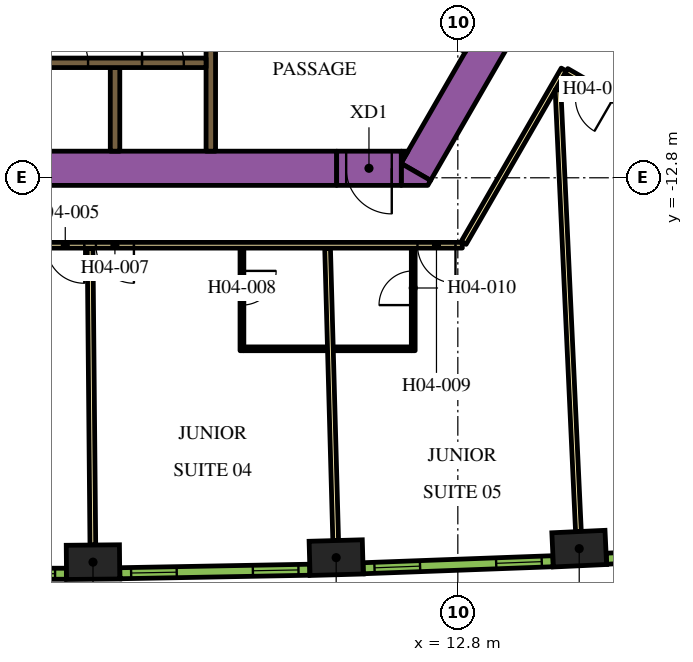
"""IFC4 building model, lengths in metres.
Left out: names, types, materials, properties, quantities, classifications, styles, units other than length and angle.
Written with IfcOpenShell. Run it as: python <this file> out.ifc"""

import sys

from ifc_helpers import new_model, si_unit, direction, frame, frame_2d, origin, origin_2d, place, context, subcontext, project, spatial, polyline, rectangle, outline, extrude, element, fill, save


model = new_model("IFC4")
c1 = context("Model", 3, precision=1e-05, world=origin(), true_north=direction((0.0, 1.0)))
c2 = subcontext(c1, "Body", "Model", "MODEL_VIEW")
j1 = project(units=[si_unit("LENGTHUNIT", "METRE"), si_unit("PLANEANGLEUNIT", "RADIAN")], contexts=[c1])
p1 = place(None, origin())
s1 = spatial("IfcSite", under=j1, at=p1, CompositionType="ELEMENT")
p2 = place(p1, origin())
s2 = spatial("IfcBuilding", under=s1, at=p2, CompositionType="ELEMENT")
p3 = place(p2, frame((0.0, 0.0, 70.5)))
s3 = spatial("IfcBuildingStorey", under=s2, at=p3, CompositionType="ELEMENT", Elevation=70.5)
for number, where, z_axis, x_axis in (
    (1, (3.2, -22.913, 0.0), (0.0, 0.0, 1.0), (1.0, 0.009, 0.0)),
    (2, (9.599, -22.795, 0.0), (0.0, 0.0, 1.0), (1.0, 0.028, 0.0)),
    (3, (15.994, -22.558, 0.0), (0.0, 0.0, 1.0), (0.999, 0.046, 0.0)),
):
    element("IfcColumn", number, at=place(p3, frame(where, z_axis=z_axis, x_axis=x_axis)), inside=s3, PredefinedType="COLUMN", context=c2, shape_type="SweptSolid", body=[
        extrude(rectangle(XDim=1.4, YDim=0.9, at=origin_2d()), origin(), (0.0, 0.0, 1.0), 3.9),
    ])
p4 = place(p3, frame((11.695, -12.644, 0.0), z_axis=(0.0, 0.0, 1.0), x_axis=(0.500010229568, 0.86601949766, 0.0)))
e4 = element("IfcWall", 4, at=p4, inside=s3, PredefinedType="SOLIDWALL", context=c2, shape_type="SweptSolid", body=[
    extrude(rectangle(XDim=9.326, YDim=0.9, at=frame_2d((4.663, 0.0))), origin(), (0.0, 0.0, 1.0), 3.9),
])
p5 = place(p3, origin())
e5 = element("IfcWall", 5, at=p5, inside=s3, PredefinedType="SOLIDWALL", context=c2, shape_type="SweptSolid", body=[
    extrude(outline(polyline([(12.009, -13.0), (11.312, -13.0), (11.312, -12.425), (12.083, -12.871), (12.009, -13.0)])), origin(), (0.0, 0.0, 1.0), 3.9),
])
e6 = element("IfcWall", 6, at=p5, inside=s3, PredefinedType="SOLIDWALL", context=c2, shape_type="SweptSolid", body=[
    extrude(outline(polyline([(11.489, -12.1), (11.312, -12.407), (11.312, -12.1), (11.489, -12.1)])), origin(), (0.0, 0.0, 1.0), 3.9),
])
p6 = place(p3, frame((-12.019, -12.55, 0.0), z_axis=(0.0, 0.0, 1.0), x_axis=(1.0, 0.0, 0.0)))
e7 = element("IfcWall", 7, at=p6, inside=s3, PredefinedType="SOLIDWALL", context=c2, shape_type="SweptSolid", body=[
    extrude(rectangle(XDim=21.63, YDim=0.9, at=frame_2d((10.815, 0.0))), origin(), (0.0, 0.0, 1.0), 3.9),
])
p7 = place(p3, frame((6.3, -12.1, 0.0), z_axis=(0.0, 0.0, 1.0), x_axis=(0.0, 1.0, 0.0)))
e8 = element("IfcWall", 8, at=p7, inside=s3, PredefinedType="SOLIDWALL", context=c2, shape_type="SweptSolid", body=[
    extrude(rectangle(XDim=3.428, YDim=0.25, at=frame_2d((1.714, 0.0))), origin(), (0.0, 0.0, 1.0), 3.9),
])
p8 = place(p3, frame((3.78, -12.1, 0.0), z_axis=(0.0, 0.0, 1.0), x_axis=(0.0, 1.0, 0.0)))
e9 = element("IfcWall", 9, at=p8, inside=s3, PredefinedType="SOLIDWALL", context=c2, shape_type="SweptSolid", body=[
    extrude(rectangle(XDim=2.2, YDim=0.25, at=frame_2d((1.1, 0.0))), origin(), (0.0, 0.0, 1.0), 3.9),
])
p9 = place(p3, frame((-6.175, -9.775, 0.0), z_axis=(0.0, 0.0, 1.0), x_axis=(1.0, 0.0, 0.0)))
e10 = element("IfcWall", 10, at=p9, inside=s3, PredefinedType="SOLIDWALL", context=c2, shape_type="SweptSolid", body=[
    extrude(rectangle(XDim=12.35, YDim=0.25, at=frame_2d((6.175, 0.0))), origin(), (0.0, 0.0, 1.0), 3.9),
])
p10 = place(p9, frame((0.585, 0.0, 0.0)))
e11 = element("IfcOpeningElement", 11, at=p10, cuts=e10, PredefinedType="OPENING", context=c2, shape_type="SweptSolid", body=[
    extrude(rectangle(XDim=1.1, YDim=2.1, at=frame_2d((0.55, 1.05))), frame((0.0, 0.135, 0.0), z_axis=(0.0, -1.0, 0.0), x_axis=(1.0, 0.0, 0.0)), (0.0, 0.0, 1.0), 0.27),
])
p11 = place(p9, frame((3.105, 0.0, 0.0)))
e12 = element("IfcOpeningElement", 12, at=p11, cuts=e10, PredefinedType="OPENING", context=c2, shape_type="SweptSolid", body=[
    extrude(rectangle(XDim=1.1, YDim=2.1, at=frame_2d((0.55, 1.05))), frame((0.0, 0.135, 0.0), z_axis=(0.0, -1.0, 0.0), x_axis=(1.0, 0.0, 0.0)), (0.0, 0.0, 1.0), 0.27),
])
p12 = place(p9, frame((5.625, 0.0, 0.0)))
e13 = element("IfcOpeningElement", 13, at=p12, cuts=e10, PredefinedType="OPENING", context=c2, shape_type="SweptSolid", body=[
    extrude(rectangle(XDim=1.1, YDim=2.1, at=frame_2d((0.55, 1.05))), frame((0.0, 0.135, 0.0), z_axis=(0.0, -1.0, 0.0), x_axis=(1.0, 0.0, 0.0)), (0.0, 0.0, 1.0), 0.27),
])
p13 = place(p9, frame((8.145, 0.0, 0.0)))
e14 = element("IfcOpeningElement", 14, at=p13, cuts=e10, PredefinedType="OPENING", context=c2, shape_type="SweptSolid", body=[
    extrude(rectangle(XDim=1.1, YDim=2.1, at=frame_2d((0.55, 1.05))), frame((0.0, 0.135, 0.0), z_axis=(0.0, -1.0, 0.0), x_axis=(1.0, 0.0, 0.0)), (0.0, 0.0, 1.0), 0.27),
])
p14 = place(p9, frame((10.665, 0.0, 0.0)))
e15 = element("IfcOpeningElement", 15, at=p14, cuts=e10, PredefinedType="OPENING", context=c2, shape_type="SweptSolid", body=[
    extrude(rectangle(XDim=1.1, YDim=2.1, at=frame_2d((0.55, 1.05))), frame((0.0, 0.135, 0.0), z_axis=(0.0, -1.0, 0.0), x_axis=(1.0, 0.0, 0.0)), (0.0, 0.0, 1.0), 0.27),
])
p15 = place(p3, frame((11.312, -12.55, 0.0), z_axis=(0.0, 0.0, 1.0), x_axis=(-1.0, 0.0, 0.0)))
e16 = element("IfcWall", 16, at=p15, inside=s3, PredefinedType="SOLIDWALL", context=c2, shape_type="SweptSolid", body=[
    extrude(rectangle(XDim=1.7, YDim=0.9, at=frame_2d((0.85, 0.0))), origin(), (0.0, 0.0, 1.0), 3.9),
])
p16 = place(p15, frame((0.25, 0.0, 0.0)))
e17 = element("IfcOpeningElement", 17, at=p16, cuts=e16, PredefinedType="OPENING", context=c2, shape_type="SweptSolid", body=[
    extrude(rectangle(XDim=1.2, YDim=2.1, at=frame_2d((0.6, 1.05))), frame((0.0, 0.46, 0.0), z_axis=(0.0, -1.0, 0.0), x_axis=(1.0, 0.0, 0.0)), (0.0, 0.0, 1.0), 0.92),
])
p17 = place(p3, frame((16.412, -8.523, 0.0), z_axis=(0.0, 0.0, 1.0), x_axis=(0.866022197818, -0.500005552856, 0.0)))
e18 = element("IfcWall", 18, at=p17, inside=s3, PredefinedType="PARTITIONING", context=c2, shape_type="SweptSolid", body=[
    extrude(rectangle(XDim=16.224, YDim=0.15, at=frame_2d((8.112, 0.0))), origin(), (0.0, 0.0, 1.0), 2.75),
])
p18 = place(p17, frame((4.223, 0.0, 0.0)))
e19 = element("IfcOpeningElement", 19, at=p18, cuts=e18, PredefinedType="OPENING", context=c2, shape_type="SweptSolid", body=[
    extrude(rectangle(XDim=1.0, YDim=2.1, at=frame_2d((0.5, 1.05))), frame((0.0, 0.085, 0.0), z_axis=(0.0, -1.0, 0.0), x_axis=(1.0, 0.0, 0.0)), (0.0, 0.0, 1.0), 0.17),
])
p19 = place(p3, frame((12.918, -14.575, 0.0), z_axis=(0.0, 0.0, 1.0), x_axis=(-1.0, 0.0, 0.0)))
e20 = element("IfcWall", 20, at=p19, inside=s3, PredefinedType="PARTITIONING", context=c2, shape_type="SweptSolid", body=[
    extrude(rectangle(XDim=25.766, YDim=0.15, at=frame_2d((12.883, 0.0))), origin(), (0.0, 0.0, 1.0), 2.75),
])
p20 = place(p19, frame((24.586, 0.0, 0.0)))
e21 = element("IfcOpeningElement", 21, at=p20, cuts=e20, PredefinedType="OPENING", context=c2, shape_type="SweptSolid", body=[
    extrude(rectangle(XDim=1.0, YDim=2.1, at=frame_2d((0.5, 1.05))), frame((0.0, 0.085, 0.0), z_axis=(0.0, -1.0, 0.0), x_axis=(1.0, 0.0, 0.0)), (0.0, 0.0, 1.0), 0.17),
])
p21 = place(p19, frame((9.948, 0.0, 0.0)))
e22 = element("IfcOpeningElement", 22, at=p21, cuts=e20, PredefinedType="OPENING", context=c2, shape_type="SweptSolid", body=[
    extrude(rectangle(XDim=1.0, YDim=2.1, at=frame_2d((0.5, 1.05))), frame((0.0, 0.085, 0.0), z_axis=(0.0, -1.0, 0.0), x_axis=(1.0, 0.0, 0.0)), (0.0, 0.0, 1.0), 0.17),
])
p22 = place(p19, frame((8.642, 0.0, 0.0)))
e23 = element("IfcOpeningElement", 23, at=p22, cuts=e20, PredefinedType="OPENING", context=c2, shape_type="SweptSolid", body=[
    extrude(rectangle(XDim=1.0, YDim=2.1, at=frame_2d((0.5, 1.05))), frame((0.0, 0.085, 0.0), z_axis=(0.0, -1.0, 0.0), x_axis=(1.0, 0.0, 0.0)), (0.0, 0.0, 1.0), 0.17),
])
p23 = place(p19, frame((0.18, 0.0, 0.0)))
e24 = element("IfcOpeningElement", 24, at=p23, cuts=e20, PredefinedType="OPENING", context=c2, shape_type="SweptSolid", body=[
    extrude(rectangle(XDim=1.0, YDim=2.1, at=frame_2d((0.5, 1.05))), frame((0.0, 0.085, 0.0), z_axis=(0.0, -1.0, 0.0), x_axis=(1.0, 0.0, 0.0)), (0.0, 0.0, 1.0), 0.17),
])
p24 = place(p3, frame((15.587, -9.952, 0.0), z_axis=(0.0, 0.0, 1.0), x_axis=(-0.500016618951, -0.866015808616, 0.0)))
e25 = element("IfcWall", 25, at=p24, inside=s3, PredefinedType="PARTITIONING", context=c2, shape_type="SweptSolid", body=[
    extrude(rectangle(XDim=5.268, YDim=0.15, at=frame_2d((2.634, 0.0))), origin(), (0.0, 0.0, 1.0), 2.75),
])
p25 = place(p3, frame((29.638, -18.064, 0.0), z_axis=(0.0, 0.0, 1.0), x_axis=(-0.866026175601, 0.499998663172, 0.0)))
e26 = element("IfcWall", 26, at=p25, inside=s3, PredefinedType="PARTITIONING", context=c2, shape_type="SweptSolid", body=[
    extrude(rectangle(XDim=16.144, YDim=0.15, at=frame_2d((8.072, 0.0))), origin(), (0.0, 0.0, 1.0), 2.75),
])
p26 = place(p25, frame((14.714, 0.0, 0.0)))
e27 = element("IfcOpeningElement", 27, at=p26, cuts=e26, PredefinedType="OPENING", context=c2, shape_type="SweptSolid", body=[
    extrude(rectangle(XDim=1.0, YDim=2.1, at=frame_2d((0.5, 1.05))), frame((0.0, 0.085, 0.0), z_axis=(0.0, -1.0, 0.0), x_axis=(1.0, 0.0, 0.0)), (0.0, 0.0, 1.0), 0.17),
])
p27 = place(p25, frame((7.275, 0.0, 0.0)))
e28 = element("IfcOpeningElement", 28, at=p27, cuts=e26, PredefinedType="OPENING", context=c2, shape_type="SweptSolid", body=[
    extrude(rectangle(XDim=1.0, YDim=2.1, at=frame_2d((0.5, 1.05))), frame((0.0, 0.085, 0.0), z_axis=(0.0, -1.0, 0.0), x_axis=(1.0, 0.0, 0.0)), (0.0, 0.0, 1.0), 0.17),
])
p28 = place(p3, frame((3.196, -22.463, 0.0), z_axis=(0.0, 0.0, 1.0), x_axis=(-0.00926060032, 0.999957119721, 0.0)))
e29 = element("IfcWall", 29, at=p28, inside=s3, PredefinedType="PARTITIONING", context=c2, shape_type="SweptSolid", body=[
    extrude(rectangle(XDim=7.803, YDim=0.15, at=frame_2d((3.902, 0.0))), origin(), (0.0, 0.0, 1.0), 2.75),
])
p29 = place(p3, frame((9.586, -22.345, 0.0), z_axis=(0.0, 0.0, 1.0), x_axis=(-0.027722115646, 0.999615668297, 0.0)))
e30 = element("IfcWall", 30, at=p29, inside=s3, PredefinedType="PARTITIONING", context=c2, shape_type="SweptSolid", body=[
    extrude(rectangle(XDim=7.688, YDim=0.15, at=frame_2d((3.844, 0.0))), origin(), (0.0, 0.0, 1.0), 2.75),
])
p30 = place(p3, frame((15.973, -22.109, 0.0), z_axis=(0.0, 0.0, 1.0), x_axis=(-0.046191717129, 0.998932592955, 0.0)))
e31 = element("IfcWall", 31, at=p30, inside=s3, PredefinedType="PARTITIONING", context=c2, shape_type="SweptSolid", body=[
    extrude(rectangle(XDim=11.638, YDim=0.15, at=frame_2d((5.819, 0.0))), origin(), (0.0, 0.0, 1.0), 2.75),
])
p31 = place(p3, frame((7.119, -14.65, 0.0), z_axis=(0.0, 0.0, 1.0), x_axis=(0.0, -1.0, 0.0)))
e32 = element("IfcWall", 32, at=p31, inside=s3, PredefinedType="PARTITIONING", context=c2, shape_type="SweptSolid", body=[
    extrude(rectangle(XDim=2.7, YDim=0.1, at=frame_2d((1.35, 0.0))), origin(), (0.0, 0.0, 1.0), 2.75),
])
p32 = place(p31, frame((0.6, 0.0, 0.0)))
e33 = element("IfcOpeningElement", 33, at=p32, cuts=e32, PredefinedType="OPENING", context=c2, shape_type="SweptSolid", body=[
    extrude(rectangle(XDim=0.9, YDim=2.1, at=frame_2d((0.45, 1.05))), frame((0.0, 0.06, 0.0), z_axis=(0.0, -1.0, 0.0), x_axis=(1.0, 0.0, 0.0)), (0.0, 0.0, 1.0), 0.12),
])
p33 = place(p3, frame((7.169, -17.3, 0.0), z_axis=(0.0, 0.0, 1.0), x_axis=(1.0, 0.0, 0.0)))
e34 = element("IfcWall", 34, at=p33, inside=s3, PredefinedType="PARTITIONING", context=c2, shape_type="SweptSolid", body=[
    extrude(rectangle(XDim=2.2, YDim=0.1, at=frame_2d((1.1, 0.0))), origin(), (0.0, 0.0, 1.0), 2.75),
])
p34 = place(p3, frame((11.627, -17.35, 0.0), z_axis=(0.0, 0.0, 1.0), x_axis=(0.0, 1.0, 0.0)))
e35 = element("IfcWall", 35, at=p34, inside=s3, PredefinedType="PARTITIONING", context=c2, shape_type="SweptSolid", body=[
    extrude(rectangle(XDim=2.7, YDim=0.1, at=frame_2d((1.35, 0.0))), origin(), (0.0, 0.0, 1.0), 2.75),
])
p35 = place(p34, frame((1.2, 0.0, 0.0)))
e36 = element("IfcOpeningElement", 36, at=p35, cuts=e35, PredefinedType="OPENING", context=c2, shape_type="SweptSolid", body=[
    extrude(rectangle(XDim=0.9, YDim=2.1, at=frame_2d((0.45, 1.05))), frame((0.0, 0.06, 0.0), z_axis=(0.0, -1.0, 0.0), x_axis=(1.0, 0.0, 0.0)), (0.0, 0.0, 1.0), 0.12),
])
p36 = place(p3, frame((11.577, -17.3, 0.0), z_axis=(0.0, 0.0, 1.0), x_axis=(-1.0, 0.0, 0.0)))
e37 = element("IfcWall", 37, at=p36, inside=s3, PredefinedType="PARTITIONING", context=c2, shape_type="SweptSolid", body=[
    extrude(rectangle(XDim=2.05, YDim=0.1, at=frame_2d((1.025, 0.0))), origin(), (0.0, 0.0, 1.0), 2.75),
])
p37 = place(p3, frame((-2.499, -23.218, 0.0), z_axis=(0.0, 0.0, 1.0), x_axis=(1.0, 0.0, 0.0)))
e38 = element("IfcWall", 38, at=p37, inside=s3, PredefinedType="SOLIDWALL", context=c2, shape_type="SweptSolid", body=[
    extrude(rectangle(XDim=4.998, YDim=0.29, at=frame_2d((2.499, 0.0))), origin(), (0.0, 0.0, 1.0), 3.65),
])
p38 = place(p37, frame((0.297, 0.0, 0.9)))
e39 = element("IfcOpeningElement", 39, at=p38, cuts=e38, PredefinedType="OPENING", context=c2, shape_type="SweptSolid", body=[
    extrude(rectangle(XDim=1.2, YDim=2.15, at=frame_2d((0.6, 1.075))), frame((0.0, 0.155, 0.0), z_axis=(0.0, -1.0, 0.0), x_axis=(1.0, 0.0, 0.0)), (0.0, 0.0, 1.0), 0.31),
])
p39 = place(p37, frame((3.501, 0.0, 0.9)))
e40 = element("IfcOpeningElement", 40, at=p39, cuts=e38, PredefinedType="OPENING", context=c2, shape_type="SweptSolid", body=[
    extrude(rectangle(XDim=1.2, YDim=2.15, at=frame_2d((0.6, 1.075))), frame((0.0, 0.155, 0.0), z_axis=(0.0, -1.0, 0.0), x_axis=(1.0, 0.0, 0.0)), (0.0, 0.0, 1.0), 0.31),
])
p40 = place(p3, frame((3.906, -23.205, 0.0), z_axis=(0.0, 0.0, 1.0), x_axis=(0.999829529479, 0.018463801951, 0.0)))
e41 = element("IfcWall", 41, at=p40, inside=s3, PredefinedType="SOLIDWALL", context=c2, shape_type="SweptSolid", body=[
    extrude(rectangle(XDim=4.998, YDim=0.29, at=frame_2d((2.499, 0.0))), origin(), (0.0, 0.0, 1.0), 3.65),
])
p41 = place(p40, frame((0.297, 0.0, 0.9)))
e42 = element("IfcOpeningElement", 42, at=p41, cuts=e41, PredefinedType="OPENING", context=c2, shape_type="SweptSolid", body=[
    extrude(rectangle(XDim=1.2, YDim=2.15, at=frame_2d((0.6, 1.075))), frame((0.0, 0.155, 0.0), z_axis=(0.0, -1.0, 0.0), x_axis=(1.0, 0.0, 0.0)), (0.0, 0.0, 1.0), 0.31),
])
p42 = place(p40, frame((3.501, 0.0, 0.9)))
e43 = element("IfcOpeningElement", 43, at=p42, cuts=e41, PredefinedType="OPENING", context=c2, shape_type="SweptSolid", body=[
    extrude(rectangle(XDim=1.2, YDim=2.15, at=frame_2d((0.6, 1.075))), frame((0.0, 0.155, 0.0), z_axis=(0.0, -1.0, 0.0), x_axis=(1.0, 0.0, 0.0)), (0.0, 0.0, 1.0), 0.31),
])
p43 = place(p3, frame((10.31, -23.074, 0.0), z_axis=(0.0, 0.0, 1.0), x_axis=(0.999317974969, 0.036926750529, 0.0)))
e44 = element("IfcWall", 44, at=p43, inside=s3, PredefinedType="SOLIDWALL", context=c2, shape_type="SweptSolid", body=[
    extrude(rectangle(XDim=4.998, YDim=0.29, at=frame_2d((2.499, 0.0))), origin(), (0.0, 0.0, 1.0), 3.65),
])
p44 = place(p43, frame((0.297, 0.0, 0.9)))
e45 = element("IfcOpeningElement", 45, at=p44, cuts=e44, PredefinedType="OPENING", context=c2, shape_type="SweptSolid", body=[
    extrude(rectangle(XDim=1.2, YDim=2.15, at=frame_2d((0.6, 1.075))), frame((0.0, 0.155, 0.0), z_axis=(0.0, -1.0, 0.0), x_axis=(1.0, 0.0, 0.0)), (0.0, 0.0, 1.0), 0.31),
])
p45 = place(p43, frame((3.501, 0.0, 0.9)))
e46 = element("IfcOpeningElement", 46, at=p45, cuts=e44, PredefinedType="OPENING", context=c2, shape_type="SweptSolid", body=[
    extrude(rectangle(XDim=1.2, YDim=2.15, at=frame_2d((0.6, 1.075))), frame((0.0, 0.155, 0.0), z_axis=(0.0, -1.0, 0.0), x_axis=(1.0, 0.0, 0.0)), (0.0, 0.0, 1.0), 0.31),
])
p46 = place(p3, frame((16.711, -22.824, 0.0), z_axis=(0.0, 0.0, 1.0), x_axis=(0.998464708705, 0.055391564976, 0.0)))
e47 = element("IfcWall", 47, at=p46, inside=s3, PredefinedType="SOLIDWALL", context=c2, shape_type="SweptSolid", body=[
    extrude(rectangle(XDim=4.998, YDim=0.29, at=frame_2d((2.499, 0.0))), origin(), (0.0, 0.0, 1.0), 3.65),
])
p47 = place(p46, frame((0.297, 0.0, 0.9)))
e48 = element("IfcOpeningElement", 48, at=p47, cuts=e47, PredefinedType="OPENING", context=c2, shape_type="SweptSolid", body=[
    extrude(rectangle(XDim=1.2, YDim=2.15, at=frame_2d((0.6, 1.075))), frame((0.0, 0.155, 0.0), z_axis=(0.0, -1.0, 0.0), x_axis=(1.0, 0.0, 0.0)), (0.0, 0.0, 1.0), 0.31),
])
p48 = place(p46, frame((3.501, 0.0, 0.9)))
e49 = element("IfcOpeningElement", 49, at=p48, cuts=e47, PredefinedType="OPENING", context=c2, shape_type="SweptSolid", body=[
    extrude(rectangle(XDim=1.2, YDim=2.15, at=frame_2d((0.6, 1.075))), frame((0.0, 0.155, 0.0), z_axis=(0.0, -1.0, 0.0), x_axis=(1.0, 0.0, 0.0)), (0.0, 0.0, 1.0), 0.31),
])
p49 = place(p13, origin())
e50 = element("IfcDoor", 50, at=p49, inside=s3, OperationType="DOUBLE_DOOR_SLIDING", PredefinedType="DOOR", context=c2, shape_type="SweptSolid", body=[
    extrude(rectangle(XDim=1.1, YDim=2.1, at=frame_2d((0.55, 1.05))), frame((0.0, 0.025, 0.0), z_axis=(0.0, -1.0, 0.0), x_axis=(1.0, 0.0, 0.0)), (0.0, 0.0, 1.0), 0.05),
])
fill(e14, e50)
p50 = place(p14, origin())
e51 = element("IfcDoor", 51, at=p50, inside=s3, OperationType="DOUBLE_DOOR_SLIDING", PredefinedType="DOOR", context=c2, shape_type="SweptSolid", body=[
    extrude(rectangle(XDim=1.1, YDim=2.1, at=frame_2d((0.55, 1.05))), frame((0.0, 0.025, 0.0), z_axis=(0.0, -1.0, 0.0), x_axis=(1.0, 0.0, 0.0)), (0.0, 0.0, 1.0), 0.05),
])
fill(e15, e51)
p51 = place(p16, origin())
e52 = element("IfcDoor", 52, at=p51, inside=s3, OperationType="SINGLE_SWING_LEFT", PredefinedType="DOOR", context=c2, shape_type="SweptSolid", body=[
    extrude(rectangle(XDim=1.2, YDim=2.1, at=frame_2d((0.6, 1.05))), frame((0.0, 0.025, 0.0), z_axis=(0.0, -1.0, 0.0), x_axis=(1.0, 0.0, 0.0)), (0.0, 0.0, 1.0), 0.05),
])
fill(e17, e52)
p52 = place(p21, origin())
e53 = element("IfcDoor", 53, at=p52, inside=s3, OperationType="SINGLE_SWING_LEFT", PredefinedType="DOOR", context=c2, shape_type="SweptSolid", body=[
    extrude(rectangle(XDim=1.0, YDim=2.1, at=frame_2d((0.5, 1.05))), frame((0.0, 0.025, 0.0), z_axis=(0.0, -1.0, 0.0), x_axis=(1.0, 0.0, 0.0)), (0.0, 0.0, 1.0), 0.05),
])
fill(e22, e53)
p53 = place(p22, origin())
e54 = element("IfcDoor", 54, at=p53, inside=s3, OperationType="SINGLE_SWING_RIGHT", PredefinedType="DOOR", context=c2, shape_type="SweptSolid", body=[
    extrude(rectangle(XDim=1.0, YDim=2.1, at=frame_2d((0.5, 1.05))), frame((0.0, 0.025, 0.0), z_axis=(0.0, -1.0, 0.0), x_axis=(1.0, 0.0, 0.0)), (0.0, 0.0, 1.0), 0.05),
])
fill(e23, e54)
p54 = place(p32, origin())
e55 = element("IfcDoor", 55, at=p54, inside=s3, OperationType="SINGLE_SWING_LEFT", PredefinedType="DOOR", context=c2, shape_type="SweptSolid", body=[
    extrude(rectangle(XDim=0.9, YDim=2.1, at=frame_2d((0.45, 1.05))), frame((0.0, 0.025, 0.0), z_axis=(0.0, -1.0, 0.0), x_axis=(1.0, 0.0, 0.0)), (0.0, 0.0, 1.0), 0.05),
])
fill(e33, e55)
p55 = place(p23, origin())
e56 = element("IfcDoor", 56, at=p55, inside=s3, OperationType="SINGLE_SWING_LEFT", PredefinedType="DOOR", context=c2, shape_type="SweptSolid", body=[
    extrude(rectangle(XDim=1.0, YDim=2.1, at=frame_2d((0.5, 1.05))), frame((0.0, 0.025, 0.0), z_axis=(0.0, -1.0, 0.0), x_axis=(1.0, 0.0, 0.0)), (0.0, 0.0, 1.0), 0.05),
])
fill(e24, e56)
p56 = place(p35, origin())
e57 = element("IfcDoor", 57, at=p56, inside=s3, OperationType="SINGLE_SWING_LEFT", PredefinedType="DOOR", context=c2, shape_type="SweptSolid", body=[
    extrude(rectangle(XDim=0.9, YDim=2.1, at=frame_2d((0.45, 1.05))), frame((0.0, 0.025, 0.0), z_axis=(0.0, -1.0, 0.0), x_axis=(1.0, 0.0, 0.0)), (0.0, 0.0, 1.0), 0.05),
])
fill(e36, e57)
p57 = place(p26, origin())
e58 = element("IfcDoor", 58, at=p57, inside=s3, OperationType="SINGLE_SWING_RIGHT", PredefinedType="DOOR", context=c2, shape_type="SweptSolid", body=[
    extrude(rectangle(XDim=1.0, YDim=2.1, at=frame_2d((0.5, 1.05))), frame((0.0, 0.025, 0.0), z_axis=(0.0, -1.0, 0.0), x_axis=(1.0, 0.0, 0.0)), (0.0, 0.0, 1.0), 0.05),
])
fill(e27, e58)
p58 = place(p39, origin())
e59 = element("IfcWindow", 59, at=p58, inside=s3, PartitioningType="DOUBLE_PANEL_VERTICAL", PredefinedType="WINDOW", context=c2, shape_type="SweptSolid", body=[
    extrude(rectangle(XDim=1.2, YDim=2.15, at=frame_2d((0.6, 1.075))), frame((0.0, 0.015, 0.0), z_axis=(0.0, -1.0, 0.0), x_axis=(1.0, 0.0, 0.0)), (0.0, 0.0, 1.0), 0.06),
])
fill(e40, e59)
p59 = place(p41, origin())
e60 = element("IfcWindow", 60, at=p59, inside=s3, PartitioningType="DOUBLE_PANEL_VERTICAL", PredefinedType="WINDOW", context=c2, shape_type="SweptSolid", body=[
    extrude(rectangle(XDim=1.2, YDim=2.15, at=frame_2d((0.6, 1.075))), frame((0.0, 0.015, 0.0), z_axis=(0.0, -1.0, 0.0), x_axis=(1.0, 0.0, 0.0)), (0.0, 0.0, 1.0), 0.06),
])
fill(e42, e60)
p60 = place(p42, origin())
e61 = element("IfcWindow", 61, at=p60, inside=s3, PartitioningType="DOUBLE_PANEL_VERTICAL", PredefinedType="WINDOW", context=c2, shape_type="SweptSolid", body=[
    extrude(rectangle(XDim=1.2, YDim=2.15, at=frame_2d((0.6, 1.075))), frame((0.0, 0.015, 0.0), z_axis=(0.0, -1.0, 0.0), x_axis=(1.0, 0.0, 0.0)), (0.0, 0.0, 1.0), 0.06),
])
fill(e43, e61)
p61 = place(p44, origin())
e62 = element("IfcWindow", 62, at=p61, inside=s3, PartitioningType="DOUBLE_PANEL_VERTICAL", PredefinedType="WINDOW", context=c2, shape_type="SweptSolid", body=[
    extrude(rectangle(XDim=1.2, YDim=2.15, at=frame_2d((0.6, 1.075))), frame((0.0, 0.015, 0.0), z_axis=(0.0, -1.0, 0.0), x_axis=(1.0, 0.0, 0.0)), (0.0, 0.0, 1.0), 0.06),
])
fill(e45, e62)
p62 = place(p45, origin())
e63 = element("IfcWindow", 63, at=p62, inside=s3, PartitioningType="DOUBLE_PANEL_VERTICAL", PredefinedType="WINDOW", context=c2, shape_type="SweptSolid", body=[
    extrude(rectangle(XDim=1.2, YDim=2.15, at=frame_2d((0.6, 1.075))), frame((0.0, 0.015, 0.0), z_axis=(0.0, -1.0, 0.0), x_axis=(1.0, 0.0, 0.0)), (0.0, 0.0, 1.0), 0.06),
])
fill(e46, e63)
save(model, sys.argv[1])
